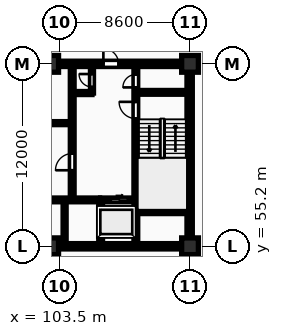
"""IFC4 building model, lengths in metres.
Left out: names, types, materials, properties, quantities, classifications, styles, units other than length and angle.
Written with IfcOpenShell. Run it as: python <this file> out.ifc"""

import sys

from ifc_helpers import new_model, si_unit, direction, frame, frame_2d, origin, origin_2d, place, context, subcontext, project, spatial, rectangle, extrude, element, fill, save


model = new_model("IFC4")
c1 = context("Model", 3, precision=1e-05, world=origin(), true_north=direction((0.0, 1.0)))
c2 = subcontext(c1, "Body", "Model", "MODEL_VIEW")
j1 = project(units=[si_unit("LENGTHUNIT", "METRE"), si_unit("PLANEANGLEUNIT", "RADIAN")], contexts=[c1])
p1 = place(None, origin())
s1 = spatial("IfcSite", under=j1, at=p1, CompositionType="ELEMENT")
p2 = place(p1, origin())
s2 = spatial("IfcBuilding", under=s1, at=p2, CompositionType="ELEMENT")
p3 = place(p2, frame((0.0, 0.0, -10.8)))
s3 = spatial("IfcBuildingStorey", under=s2, at=p3, CompositionType="ELEMENT", Elevation=-10.8)
for number, where, z_axis, x_axis in (
    (1, (102.9, 55.2, -0.45), (0.0, 0.0, 1.0), (1.0, 0.0, 0.0)),
    (2, (102.9, 67.2, -0.45), (0.0, 0.0, 1.0), (1.0, 0.0, 0.0)),
    (3, (112.1, 55.2, -0.45), (0.0, 0.0, 1.0), (1.0, 0.0, 0.0)),
    (4, (112.1, 67.2, -0.45), (0.0, 0.0, 1.0), (1.0, 0.0, 0.0)),
):
    element("IfcColumn", number, at=place(p3, frame(where, z_axis=z_axis, x_axis=x_axis)), inside=s3, PredefinedType="COLUMN", context=c2, shape_type="SweptSolid", body=[
        extrude(rectangle(XDim=1.1, YDim=1.1, at=origin_2d()), origin(), (0.0, 0.0, 1.0), 4.05),
    ])
p4 = place(p3, frame((75.95, 55.2, 0.0), z_axis=(0.0, 0.0, 1.0), x_axis=(1.0, 0.0, 0.0)))
e5 = element("IfcWall", 5, at=p4, inside=s3, PredefinedType="SHEAR", context=c2, shape_type="SweptSolid", body=[
    extrude(rectangle(XDim=36.3, YDim=0.35, at=frame_2d((18.15, 0.0))), origin(), (0.0, 0.0, 1.0), 3.6),
])
p5 = place(p3, frame((112.075, 55.375, 0.0), z_axis=(0.0, 0.0, 1.0), x_axis=(0.0, 1.0, 0.0)))
e6 = element("IfcWall", 6, at=p5, inside=s3, PredefinedType="SHEAR", context=c2, shape_type="SweptSolid", body=[
    extrude(rectangle(XDim=11.65, YDim=0.35, at=frame_2d((5.825, 0.0))), origin(), (0.0, 0.0, 1.0), 3.6),
])
p6 = place(p3, frame((75.95, 67.2, 0.0), z_axis=(0.0, 0.0, 1.0), x_axis=(1.0, 0.0, 0.0)))
e7 = element("IfcWall", 7, at=p6, inside=s3, PredefinedType="SHEAR", context=c2, shape_type="SweptSolid", body=[
    extrude(rectangle(XDim=36.3, YDim=0.35, at=frame_2d((18.15, 0.0))), origin(), (0.0, 0.0, 1.0), 3.6),
])
p7 = place(p6, frame((5.25, 0.0, 0.0)))
e8 = element("IfcOpeningElement", 8, at=p7, cuts=e7, PredefinedType="OPENING", context=c2, shape_type="SweptSolid", body=[
    extrude(rectangle(XDim=1.0, YDim=2.15, at=frame_2d((0.5, 1.075))), frame((0.0, 0.185, 0.0), z_axis=(0.0, -1.0, 0.0), x_axis=(1.0, 0.0, 0.0)), (0.0, 0.0, 1.0), 0.37),
])
p8 = place(p6, frame((21.6, 0.0, 0.0)))
e9 = element("IfcOpeningElement", 9, at=p8, cuts=e7, PredefinedType="OPENING", context=c2, shape_type="SweptSolid", body=[
    extrude(rectangle(XDim=1.5, YDim=2.2, at=frame_2d((0.75, 1.1))), frame((0.0, 0.185, 0.0), z_axis=(0.0, -1.0, 0.0), x_axis=(1.0, 0.0, 0.0)), (0.0, 0.0, 1.0), 0.37),
])
p9 = place(p6, frame((30.45, 0.0, 0.0)))
e10 = element("IfcOpeningElement", 10, at=p9, cuts=e7, PredefinedType="OPENING", context=c2, shape_type="SweptSolid", body=[
    extrude(rectangle(XDim=1.0, YDim=2.15, at=frame_2d((0.5, 1.075))), frame((0.0, 0.185, 0.0), z_axis=(0.0, -1.0, 0.0), x_axis=(1.0, 0.0, 0.0)), (0.0, 0.0, 1.0), 0.37),
])
p10 = place(p3, frame((103.85, 55.4, 0.0), z_axis=(0.0, 0.0, 1.0), x_axis=(0.0, 1.0, 0.0)))
e11 = element("IfcWall", 11, at=p10, inside=s3, PredefinedType="PARTITIONING", context=c2, shape_type="SweptSolid", body=[
    extrude(rectangle(XDim=2.72, YDim=0.2, at=frame_2d((1.36, 0.0))), origin(), (0.0, 0.0, 1.0), 3.3),
])
p11 = place(p3, frame((101.55, 58.25, 0.0), z_axis=(0.0, 0.0, 1.0), x_axis=(1.0, 0.0, 0.0)))
e12 = element("IfcWall", 12, at=p11, inside=s3, PredefinedType="SHEAR", context=c2, shape_type="SweptSolid", body=[
    extrude(rectangle(XDim=4.6, YDim=0.25, at=frame_2d((2.3, 0.0))), origin(), (0.0, 0.0, 1.0), 3.6),
])
p12 = place(p3, frame((106.22, 55.4, 0.0), z_axis=(0.0, 0.0, 1.0), x_axis=(0.0, 1.0, 0.0)))
e13 = element("IfcWall", 13, at=p12, inside=s3, PredefinedType="SHEAR", context=c2, shape_type="SweptSolid", body=[
    extrude(rectangle(XDim=2.85, YDim=0.25, at=frame_2d((1.425, 0.0))), origin(), (0.0, 0.0, 1.0), 3.6),
])
p13 = place(p3, frame((106.22, 58.25, 0.0), z_axis=(0.0, 0.0, 1.0), x_axis=(1.0, 0.0, 0.0)))
e14 = element("IfcWall", 14, at=p13, inside=s3, PredefinedType="SHEAR", context=c2, shape_type="SweptSolid", body=[
    extrude(rectangle(XDim=2.46, YDim=0.25, at=frame_2d((1.23, 0.0))), origin(), (0.0, 0.0, 1.0), 3.6),
])
p14 = place(p13, frame((0.67, 0.0, 0.0)))
e15 = element("IfcOpeningElement", 15, at=p14, cuts=e14, PredefinedType="OPENING", context=c2, shape_type="SweptSolid", body=[
    extrude(rectangle(XDim=1.12, YDim=2.12, at=frame_2d((0.56, 1.06))), frame((0.0, 0.135, 0.0), z_axis=(0.0, -1.0, 0.0), x_axis=(1.0, 0.0, 0.0)), (0.0, 0.0, 1.0), 0.27),
])
p15 = place(p3, frame((84.42, 63.3, 0.0), z_axis=(0.0, 0.0, 1.0), x_axis=(1.0, 0.0, 0.0)))
e16 = element("IfcWall", 16, at=p15, inside=s3, PredefinedType="PARTITIONING", context=c2, shape_type="SweptSolid", body=[
    extrude(rectangle(XDim=19.83, YDim=0.2, at=frame_2d((9.915, 0.0))), origin(), (0.0, 0.0, 1.0), 3.3),
])
p16 = place(p15, frame((1.15, 0.0, 0.0)))
e17 = element("IfcOpeningElement", 17, at=p16, cuts=e16, PredefinedType="OPENING", context=c2, shape_type="SweptSolid", body=[
    extrude(rectangle(XDim=0.85, YDim=2.05, at=frame_2d((0.425, 1.025))), frame((0.0, 0.11, 0.0), z_axis=(0.0, -1.0, 0.0), x_axis=(1.0, 0.0, 0.0)), (0.0, 0.0, 1.0), 0.22),
])
p17 = place(p15, frame((3.25, 0.0, 0.0)))
e18 = element("IfcOpeningElement", 18, at=p17, cuts=e16, PredefinedType="OPENING", context=c2, shape_type="SweptSolid", body=[
    extrude(rectangle(XDim=0.85, YDim=2.05, at=frame_2d((0.425, 1.025))), frame((0.0, 0.11, 0.0), z_axis=(0.0, -1.0, 0.0), x_axis=(1.0, 0.0, 0.0)), (0.0, 0.0, 1.0), 0.22),
])
p18 = place(p15, frame((13.08, 0.0, 0.0)))
e19 = element("IfcOpeningElement", 19, at=p18, cuts=e16, PredefinedType="OPENING", context=c2, shape_type="SweptSolid", body=[
    extrude(rectangle(XDim=1.5, YDim=2.2, at=frame_2d((0.75, 1.1))), frame((0.0, 0.11, 0.0), z_axis=(0.0, -1.0, 0.0), x_axis=(1.0, 0.0, 0.0)), (0.0, 0.0, 1.0), 0.22),
])
p19 = place(p15, frame((6.78, 0.0, 0.0)))
e20 = element("IfcOpeningElement", 20, at=p19, cuts=e16, PredefinedType="OPENING", context=c2, shape_type="SweptSolid", body=[
    extrude(rectangle(XDim=0.92, YDim=2.08, at=frame_2d((0.46, 1.04))), frame((0.0, 0.11, 0.0), z_axis=(0.0, -1.0, 0.0), x_axis=(1.0, 0.0, 0.0)), (0.0, 0.0, 1.0), 0.22),
])
p20 = place(p15, frame((16.28, 0.0, 0.0)))
e21 = element("IfcOpeningElement", 21, at=p20, cuts=e16, PredefinedType="OPENING", context=c2, shape_type="SweptSolid", body=[
    extrude(rectangle(XDim=0.92, YDim=2.08, at=frame_2d((0.46, 1.04))), frame((0.0, 0.11, 0.0), z_axis=(0.0, -1.0, 0.0), x_axis=(1.0, 0.0, 0.0)), (0.0, 0.0, 1.0), 0.22),
])
p21 = place(p3, frame((104.45, 65.28, 0.0), z_axis=(0.0, 0.0, 1.0), x_axis=(1.0, 0.0, 0.0)))
e22 = element("IfcWall", 22, at=p21, inside=s3, PredefinedType="PARTITIONING", context=c2, shape_type="SweptSolid", body=[
    extrude(rectangle(XDim=1.2, YDim=0.2, at=frame_2d((0.6, 0.0))), origin(), (0.0, 0.0, 1.0), 3.3),
])
p22 = place(p3, frame((105.65, 65.28, 0.0), z_axis=(0.0, 0.0, 1.0), x_axis=(0.0, 1.0, 0.0)))
e23 = element("IfcWall", 23, at=p22, inside=s3, PredefinedType="PARTITIONING", context=c2, shape_type="SweptSolid", body=[
    extrude(rectangle(XDim=1.72, YDim=0.2, at=frame_2d((0.86, 0.0))), origin(), (0.0, 0.0, 1.0), 3.3),
])
p23 = place(p22, frame((0.4, 0.0, 0.0)))
e24 = element("IfcOpeningElement", 24, at=p23, cuts=e23, PredefinedType="OPENING", context=c2, shape_type="SweptSolid", body=[
    extrude(rectangle(XDim=0.85, YDim=2.05, at=frame_2d((0.425, 1.025))), frame((0.0, 0.11, 0.0), z_axis=(0.0, -1.0, 0.0), x_axis=(1.0, 0.0, 0.0)), (0.0, 0.0, 1.0), 0.22),
])
p24 = place(p3, frame((104.35, 58.4, 0.0), z_axis=(0.0, 0.0, 1.0), x_axis=(0.0, 1.0, 0.0)))
e25 = element("IfcWall", 25, at=p24, inside=s3, PredefinedType="SHEAR", context=c2, shape_type="SweptSolid", body=[
    extrude(rectangle(XDim=8.6, YDim=0.25, at=frame_2d((4.3, 0.0))), origin(), (0.0, 0.0, 1.0), 3.6),
])
p25 = place(p24, frame((1.8, 0.0, 0.0)))
e26 = element("IfcOpeningElement", 26, at=p25, cuts=e25, PredefinedType="OPENING", context=c2, shape_type="SweptSolid", body=[
    extrude(rectangle(XDim=1.1, YDim=2.1, at=frame_2d((0.55, 1.05))), frame((0.0, 0.135, 0.0), z_axis=(0.0, -1.0, 0.0), x_axis=(1.0, 0.0, 0.0)), (0.0, 0.0, 1.0), 0.27),
])
p26 = place(p3, frame((108.535, 55.4, 0.0), z_axis=(0.0, 0.0, 1.0), x_axis=(0.0, 1.0, 0.0)))
e27 = element("IfcWall", 27, at=p26, inside=s3, PredefinedType="SHEAR", context=c2, shape_type="SweptSolid", body=[
    extrude(rectangle(XDim=11.6, YDim=0.25, at=frame_2d((5.8, 0.0))), origin(), (0.0, 0.0, 1.0), 3.6),
])
p27 = place(p26, frame((8.2, 0.0, 0.0)))
e28 = element("IfcOpeningElement", 28, at=p27, cuts=e27, PredefinedType="OPENING", context=c2, shape_type="SweptSolid", body=[
    extrude(rectangle(XDim=1.1, YDim=2.1, at=frame_2d((0.55, 1.05))), frame((0.0, 0.135, 0.0), z_axis=(0.0, -1.0, 0.0), x_axis=(1.0, 0.0, 0.0)), (0.0, 0.0, 1.0), 0.27),
])
p28 = place(p26, frame((10.25, 0.0, 0.0)))
e29 = element("IfcOpeningElement", 29, at=p28, cuts=e27, PredefinedType="OPENING", context=c2, shape_type="SweptSolid", body=[
    extrude(rectangle(XDim=0.85, YDim=2.05, at=frame_2d((0.425, 1.025))), frame((0.0, 0.135, 0.0), z_axis=(0.0, -1.0, 0.0), x_axis=(1.0, 0.0, 0.0)), (0.0, 0.0, 1.0), 0.27),
])
for number, where, z_axis, x_axis in (
    (30, (108.66, 57.475, 0.0), (0.0, 0.0, 1.0), (1.0, 0.0, 0.0)),
    (31, (108.66, 65.325, 0.0), (0.0, 0.0, 1.0), (1.0, 0.0, 0.0)),
):
    element("IfcWall", number, at=place(p3, frame(where, z_axis=z_axis, x_axis=x_axis)), inside=s3, PredefinedType="SHEAR", context=c2, shape_type="SweptSolid", body=[
        extrude(rectangle(XDim=3.24, YDim=0.25, at=frame_2d((1.62, 0.0))), origin(), (0.0, 0.0, 1.0), 3.6),
    ])
p29 = place(p9, origin())
e32 = element("IfcDoor", 32, at=p29, inside=s3, OperationType="SINGLE_SWING_LEFT", PredefinedType="DOOR", context=c2, shape_type="SweptSolid", body=[
    extrude(rectangle(XDim=1.0, YDim=2.15, at=frame_2d((0.5, 1.075))), frame((0.0, 0.025, 0.0), z_axis=(0.0, -1.0, 0.0), x_axis=(1.0, 0.0, 0.0)), (0.0, 0.0, 1.0), 0.05),
])
fill(e10, e32)
p30 = place(p14, origin())
e33 = element("IfcDoor", 33, at=p30, inside=s3, OperationType="SLIDING_TO_RIGHT", PredefinedType="DOOR", context=c2, shape_type="SweptSolid", body=[
    extrude(rectangle(XDim=1.12, YDim=2.12, at=frame_2d((0.56, 1.06))), frame((0.0, 0.025, 0.0), z_axis=(0.0, -1.0, 0.0), x_axis=(1.0, 0.0, 0.0)), (0.0, 0.0, 1.0), 0.05),
])
fill(e15, e33)
p31 = place(p23, origin())
e34 = element("IfcDoor", 34, at=p31, inside=s3, OperationType="SINGLE_SWING_RIGHT", PredefinedType="DOOR", context=c2, shape_type="SweptSolid", body=[
    extrude(rectangle(XDim=0.85, YDim=2.05, at=frame_2d((0.425, 1.025))), frame((0.0, 0.025, 0.0), z_axis=(0.0, -1.0, 0.0), x_axis=(1.0, 0.0, 0.0)), (0.0, 0.0, 1.0), 0.05),
])
fill(e24, e34)
p32 = place(p25, origin())
e35 = element("IfcDoor", 35, at=p32, inside=s3, OperationType="SINGLE_SWING_LEFT", PredefinedType="DOOR", context=c2, shape_type="SweptSolid", body=[
    extrude(rectangle(XDim=1.1, YDim=2.1, at=frame_2d((0.55, 1.05))), frame((0.0, 0.025, 0.0), z_axis=(0.0, -1.0, 0.0), x_axis=(1.0, 0.0, 0.0)), (0.0, 0.0, 1.0), 0.05),
])
fill(e26, e35)
p33 = place(p27, origin())
e36 = element("IfcDoor", 36, at=p33, inside=s3, OperationType="SINGLE_SWING_RIGHT", PredefinedType="DOOR", context=c2, shape_type="SweptSolid", body=[
    extrude(rectangle(XDim=1.1, YDim=2.1, at=frame_2d((0.55, 1.05))), frame((0.0, 0.025, 0.0), z_axis=(0.0, -1.0, 0.0), x_axis=(1.0, 0.0, 0.0)), (0.0, 0.0, 1.0), 0.05),
])
fill(e28, e36)
p34 = place(p28, origin())
e37 = element("IfcDoor", 37, at=p34, inside=s3, OperationType="SINGLE_SWING_LEFT", PredefinedType="DOOR", context=c2, shape_type="SweptSolid", body=[
    extrude(rectangle(XDim=0.85, YDim=2.05, at=frame_2d((0.425, 1.025))), frame((0.0, 0.025, 0.0), z_axis=(0.0, -1.0, 0.0), x_axis=(1.0, 0.0, 0.0)), (0.0, 0.0, 1.0), 0.05),
])
fill(e29, e37)
save(model, sys.argv[1])
